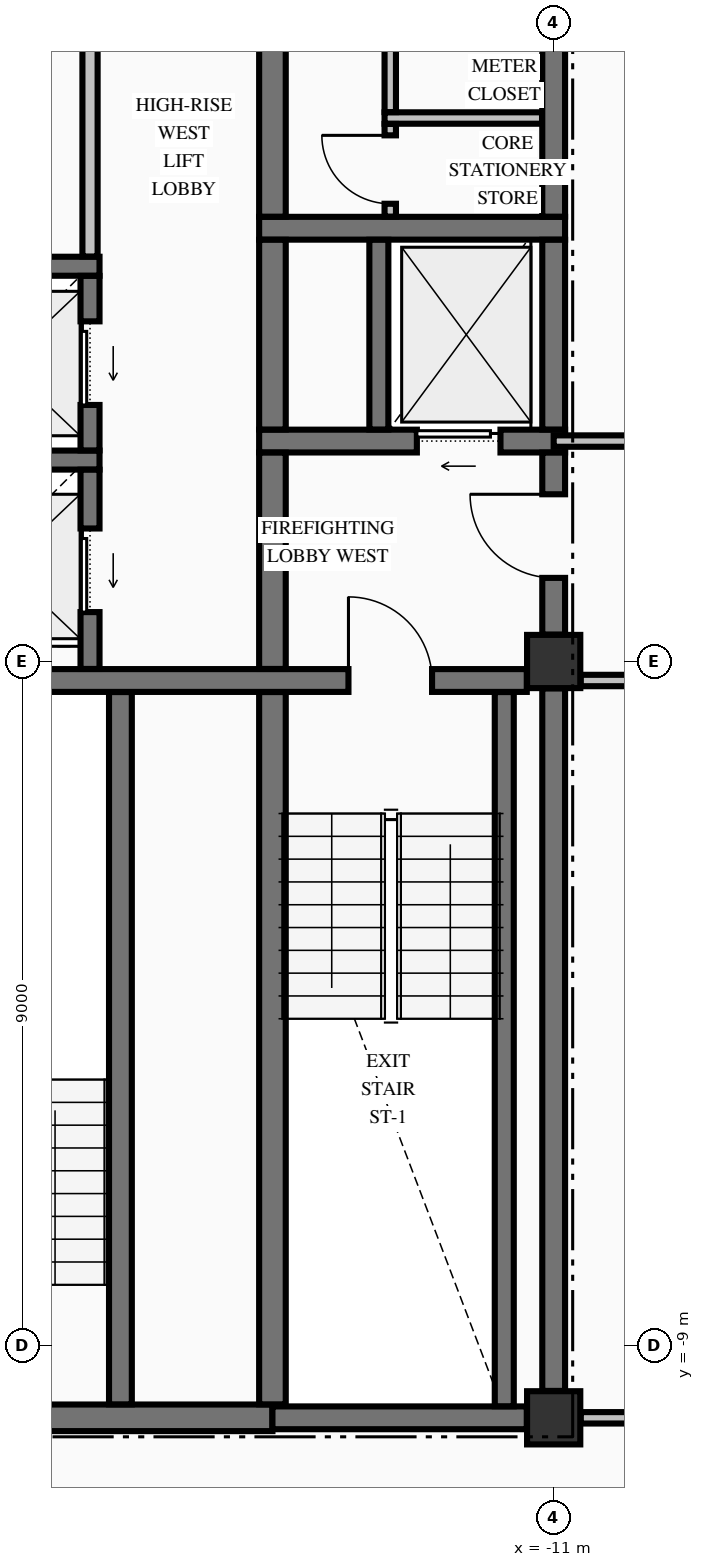
"""IFC4 building model, lengths in metres.
Left out: names, types, materials, properties, quantities, classifications, styles, units other than length and angle.
Written with IfcOpenShell. Run it as: python <this file> out.ifc"""

import sys

from ifc_helpers import new_model, si_unit, direction, frame, frame_2d, origin, origin_2d, place, context, subcontext, project, spatial, rectangle, extrude, element, fill, save


model = new_model("IFC4")
c1 = context("Model", 3, precision=1e-05, world=origin(), true_north=direction((0.0, 1.0)))
c2 = subcontext(c1, "Body", "Model", "MODEL_VIEW")
j1 = project(units=[si_unit("LENGTHUNIT", "METRE"), si_unit("PLANEANGLEUNIT", "RADIAN")], contexts=[c1])
p1 = place(None, origin())
s1 = spatial("IfcSite", under=j1, at=p1, CompositionType="ELEMENT")
p2 = place(p1, origin())
s2 = spatial("IfcBuilding", under=s1, at=p2, CompositionType="ELEMENT")
p3 = place(p2, frame((0.0, 0.0, 233.28)))
s3 = spatial("IfcBuildingStorey", under=s2, at=p3, CompositionType="ELEMENT", Elevation=233.28)
for number, where, z_axis, x_axis in (
    (1, (-11.0, -9.95, -0.25), (0.0, 0.0, 1.0), (1.0, 0.0, 0.0)),
    (2, (-11.0, 0.0, -0.25), (0.0, 0.0, 1.0), (1.0, 0.0, 0.0)),
):
    element("IfcColumn", number, at=place(p3, frame(where, z_axis=z_axis, x_axis=x_axis)), inside=s3, PredefinedType="COLUMN", context=c2, shape_type="SweptSolid", body=[
        extrude(rectangle(XDim=0.7, YDim=0.7, at=origin_2d()), origin(), (0.0, 0.0, 1.0), 3.23),
    ])
p4 = place(p3, frame((-19.646, -9.95, 0.0), z_axis=(0.0, 0.0, 1.0), x_axis=(1.0, 0.0, 0.0)))
e3 = element("IfcWall", 3, at=p4, inside=s3, PredefinedType="SHEAR", context=c2, shape_type="SweptSolid", body=[
    extrude(rectangle(XDim=4.946, YDim=0.35, at=frame_2d((2.473, 0.0))), origin(), (0.0, 0.0, 1.0), 2.98),
])
p5 = place(p4, frame((0.821, 0.0, 0.0)))
e4 = element("IfcOpeningElement", 4, at=p5, cuts=e3, PredefinedType="OPENING", context=c2, shape_type="SweptSolid", body=[
    extrude(rectangle(XDim=1.05, YDim=2.15, at=frame_2d((0.525, 1.075))), frame((0.0, 0.185, 0.0), z_axis=(0.0, -1.0, 0.0), x_axis=(1.0, 0.0, 0.0)), (0.0, 0.0, 1.0), 0.37),
])
p6 = place(p3, frame((-14.7, -9.95, 0.0), z_axis=(0.0, 0.0, 1.0), x_axis=(1.0, 0.0, 0.0)))
e5 = element("IfcWall", 5, at=p6, inside=s3, PredefinedType="SHEAR", context=c2, shape_type="SweptSolid", body=[
    extrude(rectangle(XDim=3.346, YDim=0.3, at=frame_2d((1.673, 0.0))), origin(), (0.0, 0.0, 1.0), 2.98),
])
p7 = place(p3, frame((-20.571, -0.25, 0.0), z_axis=(0.0, 0.0, 1.0), x_axis=(1.0, 0.0, 0.0)))
e6 = element("IfcWall", 6, at=p7, inside=s3, PredefinedType="SHEAR", context=c2, shape_type="SweptSolid", body=[
    extrude(rectangle(XDim=9.217, YDim=0.3, at=frame_2d((4.608, 0.0))), origin(), (0.0, 0.0, 1.0), 2.98),
])
p8 = place(p7, frame((6.871, 0.0, 0.0)))
e7 = element("IfcOpeningElement", 7, at=p8, cuts=e6, PredefinedType="OPENING", context=c2, shape_type="SweptSolid", body=[
    extrude(rectangle(XDim=1.1, YDim=2.15, at=frame_2d((0.55, 1.075))), frame((0.0, 0.16, 0.0), z_axis=(0.0, -1.0, 0.0), x_axis=(1.0, 0.0, 0.0)), (0.0, 0.0, 1.0), 0.32),
])
p9 = place(p3, frame((-20.175, 2.65, 0.0), z_axis=(0.0, 0.0, 1.0), x_axis=(1.0, 0.0, 0.0)))
e8 = element("IfcWall", 8, at=p9, inside=s3, PredefinedType="SOLIDWALL", context=c2, shape_type="SweptSolid", body=[
    extrude(rectangle(XDim=3.2, YDim=0.25, at=frame_2d((1.6, 0.0))), origin(), (0.0, 0.0, 1.0), 2.98),
])
p10 = place(p3, frame((-14.875, 2.9, 0.0), z_axis=(0.0, 0.0, 1.0), x_axis=(1.0, 0.0, 0.0)))
e9 = element("IfcWall", 9, at=p10, inside=s3, PredefinedType="SHEAR", context=c2, shape_type="SweptSolid", body=[
    extrude(rectangle(XDim=4.025, YDim=0.3, at=frame_2d((2.012, 0.0))), origin(), (0.0, 0.0, 1.0), 2.98),
])
p11 = place(p10, frame((2.075, 0.0, 0.0)))
e10 = element("IfcOpeningElement", 10, at=p11, cuts=e9, PredefinedType="OPENING", context=c2, shape_type="SweptSolid", body=[
    extrude(rectangle(XDim=1.1, YDim=2.2, at=frame_2d((0.55, 1.1))), frame((0.0, 0.16, 0.0), z_axis=(0.0, -1.0, 0.0), x_axis=(1.0, 0.0, 0.0)), (0.0, 0.0, 1.0), 0.32),
])
p12 = place(p3, frame((-20.175, 5.2, 0.0), z_axis=(0.0, 0.0, 1.0), x_axis=(1.0, 0.0, 0.0)))
e11 = element("IfcWall", 11, at=p12, inside=s3, PredefinedType="SOLIDWALL", context=c2, shape_type="SweptSolid", body=[
    extrude(rectangle(XDim=3.2, YDim=0.25, at=frame_2d((1.6, 0.0))), origin(), (0.0, 0.0, 1.0), 2.98),
])
p13 = place(p3, frame((-14.875, 5.7, 0.0), z_axis=(0.0, 0.0, 1.0), x_axis=(1.0, 0.0, 0.0)))
e12 = element("IfcWall", 12, at=p13, inside=s3, PredefinedType="SHEAR", context=c2, shape_type="SweptSolid", body=[
    extrude(rectangle(XDim=4.025, YDim=0.3, at=frame_2d((2.012, 0.0))), origin(), (0.0, 0.0, 1.0), 2.98),
])
p14 = place(p3, frame((-10.644, -9.95, 0.0), z_axis=(0.0, 0.0, 1.0), x_axis=(1.0, 0.0, 0.0)))
e13 = element("IfcWall", 13, at=p14, inside=s3, PredefinedType="PARTITIONING", context=c2, shape_type="SweptSolid", body=[
    extrude(rectangle(XDim=21.288, YDim=0.15, at=frame_2d((10.644, 0.0))), origin(), (0.0, 0.0, 1.0), 2.98),
])
p15 = place(p14, frame((8.294, 0.0, 0.0)))
e14 = element("IfcOpeningElement", 14, at=p15, cuts=e13, PredefinedType="OPENING", context=c2, shape_type="SweptSolid", body=[
    extrude(rectangle(XDim=1.1, YDim=2.15, at=frame_2d((0.55, 1.075))), frame((0.0, 0.085, 0.0), z_axis=(0.0, -1.0, 0.0), x_axis=(1.0, 0.0, 0.0)), (0.0, 0.0, 1.0), 0.17),
])
p16 = place(p14, frame((13.769, 0.0, 0.0)))
e15 = element("IfcOpeningElement", 15, at=p16, cuts=e13, PredefinedType="OPENING", context=c2, shape_type="SweptSolid", body=[
    extrude(rectangle(XDim=0.95, YDim=2.15, at=frame_2d((0.475, 1.075))), frame((0.0, 0.085, 0.0), z_axis=(0.0, -1.0, 0.0), x_axis=(1.0, 0.0, 0.0)), (0.0, 0.0, 1.0), 0.17),
])
p17 = place(p14, frame((17.994, 0.0, 0.0)))
e16 = element("IfcOpeningElement", 16, at=p17, cuts=e13, PredefinedType="OPENING", context=c2, shape_type="SweptSolid", body=[
    extrude(rectangle(XDim=0.9, YDim=2.15, at=frame_2d((0.45, 1.075))), frame((0.0, 0.085, 0.0), z_axis=(0.0, -1.0, 0.0), x_axis=(1.0, 0.0, 0.0)), (0.0, 0.0, 1.0), 0.17),
])
p18 = place(p3, frame((-10.644, -0.25, 0.0), z_axis=(0.0, 0.0, 1.0), x_axis=(1.0, 0.0, 0.0)))
e17 = element("IfcWall", 17, at=p18, inside=s3, PredefinedType="PARTITIONING", context=c2, shape_type="SweptSolid", body=[
    extrude(rectangle(XDim=21.288, YDim=0.15, at=frame_2d((10.644, 0.0))), origin(), (0.0, 0.0, 1.0), 2.98),
])
p19 = place(p18, frame((8.294, 0.0, 0.0)))
e18 = element("IfcOpeningElement", 18, at=p19, cuts=e17, PredefinedType="OPENING", context=c2, shape_type="SweptSolid", body=[
    extrude(rectangle(XDim=1.1, YDim=2.15, at=frame_2d((0.55, 1.075))), frame((0.0, 0.085, 0.0), z_axis=(0.0, -1.0, 0.0), x_axis=(1.0, 0.0, 0.0)), (0.0, 0.0, 1.0), 0.17),
])
p20 = place(p18, frame((3.169, 0.0, 0.0)))
e19 = element("IfcOpeningElement", 19, at=p20, cuts=e17, PredefinedType="OPENING", context=c2, shape_type="SweptSolid", body=[
    extrude(rectangle(XDim=1.05, YDim=2.15, at=frame_2d((0.525, 1.075))), frame((0.0, 0.085, 0.0), z_axis=(0.0, -1.0, 0.0), x_axis=(1.0, 0.0, 0.0)), (0.0, 0.0, 1.0), 0.17),
])
p21 = place(p18, frame((15.319, 0.0, 0.0)))
e20 = element("IfcOpeningElement", 20, at=p21, cuts=e17, PredefinedType="OPENING", context=c2, shape_type="SweptSolid", body=[
    extrude(rectangle(XDim=0.95, YDim=2.15, at=frame_2d((0.475, 1.075))), frame((0.0, 0.085, 0.0), z_axis=(0.0, -1.0, 0.0), x_axis=(1.0, 0.0, 0.0)), (0.0, 0.0, 1.0), 0.17),
])
p22 = place(p3, frame((-11.0, 2.9, 0.0), z_axis=(0.0, 0.0, 1.0), x_axis=(1.0, 0.0, 0.0)))
e21 = element("IfcWall", 21, at=p22, inside=s3, PredefinedType="PARTITIONING", context=c2, shape_type="SweptSolid", body=[
    extrude(rectangle(XDim=22.0, YDim=0.15, at=frame_2d((11.0, 0.0))), origin(), (0.0, 0.0, 1.0), 2.98),
])
p23 = place(p22, frame((8.65, 0.0, 0.0)))
e22 = element("IfcOpeningElement", 22, at=p23, cuts=e21, PredefinedType="OPENING", context=c2, shape_type="SweptSolid", body=[
    extrude(rectangle(XDim=1.1, YDim=2.15, at=frame_2d((0.55, 1.075))), frame((0.0, 0.085, 0.0), z_axis=(0.0, -1.0, 0.0), x_axis=(1.0, 0.0, 0.0)), (0.0, 0.0, 1.0), 0.17),
])
p24 = place(p22, frame((3.525, 0.0, 0.0)))
e23 = element("IfcOpeningElement", 23, at=p24, cuts=e21, PredefinedType="OPENING", context=c2, shape_type="SweptSolid", body=[
    extrude(rectangle(XDim=1.05, YDim=2.15, at=frame_2d((0.525, 1.075))), frame((0.0, 0.085, 0.0), z_axis=(0.0, -1.0, 0.0), x_axis=(1.0, 0.0, 0.0)), (0.0, 0.0, 1.0), 0.17),
])
p25 = place(p22, frame((12.225, 0.0, 0.0)))
e24 = element("IfcOpeningElement", 24, at=p25, cuts=e21, PredefinedType="OPENING", context=c2, shape_type="SweptSolid", body=[
    extrude(rectangle(XDim=0.95, YDim=2.15, at=frame_2d((0.475, 1.075))), frame((0.0, 0.085, 0.0), z_axis=(0.0, -1.0, 0.0), x_axis=(1.0, 0.0, 0.0)), (0.0, 0.0, 1.0), 0.17),
])
p26 = place(p22, frame((18.075, 0.0, 0.0)))
e25 = element("IfcOpeningElement", 25, at=p26, cuts=e21, PredefinedType="OPENING", context=c2, shape_type="SweptSolid", body=[
    extrude(rectangle(XDim=0.95, YDim=2.15, at=frame_2d((0.475, 1.075))), frame((0.0, 0.085, 0.0), z_axis=(0.0, -1.0, 0.0), x_axis=(1.0, 0.0, 0.0)), (0.0, 0.0, 1.0), 0.17),
])
p27 = place(p3, frame((-13.225, 7.15, 0.0), z_axis=(0.0, 0.0, 1.0), x_axis=(1.0, 0.0, 0.0)))
e26 = element("IfcWall", 26, at=p27, inside=s3, PredefinedType="PARTITIONING", context=c2, shape_type="SweptSolid", body=[
    extrude(rectangle(XDim=2.072, YDim=0.15, at=frame_2d((1.036, 0.0))), origin(), (0.0, 0.0, 1.0), 2.98),
])
p28 = place(p3, frame((-17.1, -0.098, 0.0), z_axis=(0.0, 0.0, 1.0), x_axis=(0.0, 1.0, 0.0)))
e27 = element("IfcWall", 27, at=p28, inside=s3, PredefinedType="SOLIDWALL", context=c2, shape_type="SweptSolid", body=[
    extrude(rectangle(XDim=2.621, YDim=0.25, at=frame_2d((1.311, 0.0))), origin(), (0.0, 0.0, 1.0), 2.98),
])
p29 = place(p28, frame((0.748, 0.0, 0.0)))
e28 = element("IfcOpeningElement", 28, at=p29, cuts=e27, PredefinedType="OPENING", context=c2, shape_type="SweptSolid", body=[
    extrude(rectangle(XDim=1.1, YDim=2.2, at=frame_2d((0.55, 1.1))), frame((0.0, 0.135, 0.0), z_axis=(0.0, -1.0, 0.0), x_axis=(1.0, 0.0, 0.0)), (0.0, 0.0, 1.0), 0.27),
])
p30 = place(p3, frame((-17.1, 2.777, 0.0), z_axis=(0.0, 0.0, 1.0), x_axis=(0.0, 1.0, 0.0)))
e29 = element("IfcWall", 29, at=p30, inside=s3, PredefinedType="SOLIDWALL", context=c2, shape_type="SweptSolid", body=[
    extrude(rectangle(XDim=2.296, YDim=0.25, at=frame_2d((1.148, 0.0))), origin(), (0.0, 0.0, 1.0), 2.98),
])
p31 = place(p30, frame((0.598, 0.0, 0.0)))
e30 = element("IfcOpeningElement", 30, at=p31, cuts=e29, PredefinedType="OPENING", context=c2, shape_type="SweptSolid", body=[
    extrude(rectangle(XDim=1.1, YDim=2.2, at=frame_2d((0.55, 1.1))), frame((0.0, 0.135, 0.0), z_axis=(0.0, -1.0, 0.0), x_axis=(1.0, 0.0, 0.0)), (0.0, 0.0, 1.0), 0.27),
])
p32 = place(p3, frame((-16.7, -9.773, 0.0), z_axis=(0.0, 0.0, 1.0), x_axis=(0.0, 1.0, 0.0)))
e31 = element("IfcWall", 31, at=p32, inside=s3, PredefinedType="SHEAR", context=c2, shape_type="SweptSolid", body=[
    extrude(rectangle(XDim=9.371, YDim=0.3, at=frame_2d((4.686, 0.0))), origin(), (0.0, 0.0, 1.0), 2.98),
])
p33 = place(p3, frame((-14.7, -9.773, 0.0), z_axis=(0.0, 0.0, 1.0), x_axis=(0.0, 1.0, 0.0)))
e32 = element("IfcWall", 32, at=p33, inside=s3, PredefinedType="SHEAR", context=c2, shape_type="SweptSolid", body=[
    extrude(rectangle(XDim=9.371, YDim=0.35, at=frame_2d((4.686, 0.0))), origin(), (0.0, 0.0, 1.0), 2.98),
])
p34 = place(p3, frame((-14.7, -0.098, 0.0), z_axis=(0.0, 0.0, 1.0), x_axis=(0.0, 1.0, 0.0)))
e33 = element("IfcWall", 33, at=p34, inside=s3, PredefinedType="SHEAR", context=c2, shape_type="SweptSolid", body=[
    extrude(rectangle(XDim=2.846, YDim=0.35, at=frame_2d((1.423, 0.0))), origin(), (0.0, 0.0, 1.0), 2.98),
])
p35 = place(p3, frame((-14.7, 3.052, 0.0), z_axis=(0.0, 0.0, 1.0), x_axis=(0.0, 1.0, 0.0)))
e34 = element("IfcWall", 34, at=p35, inside=s3, PredefinedType="SHEAR", context=c2, shape_type="SweptSolid", body=[
    extrude(rectangle(XDim=2.496, YDim=0.35, at=frame_2d((1.248, 0.0))), origin(), (0.0, 0.0, 1.0), 2.98),
])
p36 = place(p3, frame((-14.7, 5.852, 0.0), z_axis=(0.0, 0.0, 1.0), x_axis=(0.0, 1.0, 0.0)))
e35 = element("IfcWall", 35, at=p36, inside=s3, PredefinedType="SHEAR", context=c2, shape_type="SweptSolid", body=[
    extrude(rectangle(XDim=4.471, YDim=0.35, at=frame_2d((2.235, 0.0))), origin(), (0.0, 0.0, 1.0), 2.98),
])
p37 = place(p3, frame((-13.3, 3.052, 0.0), z_axis=(0.0, 0.0, 1.0), x_axis=(0.0, 1.0, 0.0)))
e36 = element("IfcWall", 36, at=p37, inside=s3, PredefinedType="SOLIDWALL", context=c2, shape_type="SweptSolid", body=[
    extrude(rectangle(XDim=2.496, YDim=0.25, at=frame_2d((1.248, 0.0))), origin(), (0.0, 0.0, 1.0), 2.98),
])
p38 = place(p3, frame((-11.65, -9.798, 0.0), z_axis=(0.0, 0.0, 1.0), x_axis=(0.0, 1.0, 0.0)))
e37 = element("IfcWall", 37, at=p38, inside=s3, PredefinedType="SOLIDWALL", context=c2, shape_type="SweptSolid", body=[
    extrude(rectangle(XDim=9.396, YDim=0.25, at=frame_2d((4.698, 0.0))), origin(), (0.0, 0.0, 1.0), 2.98),
])
p39 = place(p3, frame((-11.0, -9.596, 0.0), z_axis=(0.0, 0.0, 1.0), x_axis=(0.0, 1.0, 0.0)))
e38 = element("IfcWall", 38, at=p39, inside=s3, PredefinedType="SHEAR", context=c2, shape_type="SweptSolid", body=[
    extrude(rectangle(XDim=9.242, YDim=0.3, at=frame_2d((4.621, 0.0))), origin(), (0.0, 0.0, 1.0), 2.98),
])
p40 = place(p3, frame((-11.0, 0.354, 0.0), z_axis=(0.0, 0.0, 1.0), x_axis=(0.0, 1.0, 0.0)))
e39 = element("IfcWall", 39, at=p40, inside=s3, PredefinedType="SHEAR", context=c2, shape_type="SweptSolid", body=[
    extrude(rectangle(XDim=2.394, YDim=0.3, at=frame_2d((1.197, 0.0))), origin(), (0.0, 0.0, 1.0), 2.98),
])
p41 = place(p40, frame((0.746, 0.0, 0.0)))
e40 = element("IfcOpeningElement", 40, at=p41, cuts=e39, PredefinedType="OPENING", context=c2, shape_type="SweptSolid", body=[
    extrude(rectangle(XDim=1.1, YDim=2.15, at=frame_2d((0.55, 1.075))), frame((0.0, 0.16, 0.0), z_axis=(0.0, -1.0, 0.0), x_axis=(1.0, 0.0, 0.0)), (0.0, 0.0, 1.0), 0.32),
])
p42 = place(p3, frame((-11.0, 3.052, 0.0), z_axis=(0.0, 0.0, 1.0), x_axis=(0.0, 1.0, 0.0)))
e41 = element("IfcWall", 41, at=p42, inside=s3, PredefinedType="SHEAR", context=c2, shape_type="SweptSolid", body=[
    extrude(rectangle(XDim=2.496, YDim=0.3, at=frame_2d((1.248, 0.0))), origin(), (0.0, 0.0, 1.0), 2.98),
])
p43 = place(p3, frame((-11.0, 5.852, 0.0), z_axis=(0.0, 0.0, 1.0), x_axis=(0.0, 1.0, 0.0)))
e42 = element("IfcWall", 42, at=p43, inside=s3, PredefinedType="SHEAR", context=c2, shape_type="SweptSolid", body=[
    extrude(rectangle(XDim=4.294, YDim=0.3, at=frame_2d((2.147, 0.0))), origin(), (0.0, 0.0, 1.0), 2.98),
])
p44 = place(p3, frame((-17.1, 5.328, 0.0), z_axis=(0.0, 0.0, 1.0), x_axis=(0.0, 1.0, 0.0)))
e43 = element("IfcWall", 43, at=p44, inside=s3, PredefinedType="PARTITIONING", context=c2, shape_type="SweptSolid", body=[
    extrude(rectangle(XDim=4.994, YDim=0.2, at=frame_2d((2.497, 0.0))), origin(), (0.0, 0.0, 1.0), 2.98),
])
p45 = place(p3, frame((-13.15, 5.853, 0.0), z_axis=(0.0, 0.0, 1.0), x_axis=(0.0, 1.0, 0.0)))
e44 = element("IfcWall", 44, at=p45, inside=s3, PredefinedType="PARTITIONING", context=c2, shape_type="SweptSolid", body=[
    extrude(rectangle(XDim=1.219, YDim=0.15, at=frame_2d((0.609, 0.0))), origin(), (0.0, 0.0, 1.0), 2.98),
])
p46 = place(p45, frame((0.169, 0.0, 0.0)))
e45 = element("IfcOpeningElement", 45, at=p46, cuts=e44, PredefinedType="OPENING", context=c2, shape_type="SweptSolid", body=[
    extrude(rectangle(XDim=0.9, YDim=2.15, at=frame_2d((0.45, 1.075))), frame((0.0, 0.085, 0.0), z_axis=(0.0, -1.0, 0.0), x_axis=(1.0, 0.0, 0.0)), (0.0, 0.0, 1.0), 0.17),
])
p47 = place(p3, frame((-13.15, 7.228, 0.0), z_axis=(0.0, 0.0, 1.0), x_axis=(0.0, 1.0, 0.0)))
e46 = element("IfcWall", 46, at=p47, inside=s3, PredefinedType="PARTITIONING", context=c2, shape_type="SweptSolid", body=[
    extrude(rectangle(XDim=3.119, YDim=0.15, at=frame_2d((1.56, 0.0))), origin(), (0.0, 0.0, 1.0), 2.98),
])
p48 = place(p47, frame((1.097, 0.0, 0.0)))
e47 = element("IfcOpeningElement", 47, at=p48, cuts=e46, PredefinedType="OPENING", context=c2, shape_type="SweptSolid", body=[
    extrude(rectangle(XDim=0.95, YDim=2.15, at=frame_2d((0.475, 1.075))), frame((0.0, 0.085, 0.0), z_axis=(0.0, -1.0, 0.0), x_axis=(1.0, 0.0, 0.0)), (0.0, 0.0, 1.0), 0.17),
])
p49 = place(p8, origin())
e48 = element("IfcDoor", 48, at=p49, inside=s3, OperationType="SINGLE_SWING_LEFT", PredefinedType="DOOR", context=c2, shape_type="SweptSolid", body=[
    extrude(rectangle(XDim=1.1, YDim=2.15, at=frame_2d((0.55, 1.075))), frame((0.0, 0.025, 0.0), z_axis=(0.0, -1.0, 0.0), x_axis=(1.0, 0.0, 0.0)), (0.0, 0.0, 1.0), 0.05),
])
fill(e7, e48)
p50 = place(p41, origin())
e49 = element("IfcDoor", 49, at=p50, inside=s3, OperationType="SINGLE_SWING_RIGHT", PredefinedType="DOOR", context=c2, shape_type="SweptSolid", body=[
    extrude(rectangle(XDim=1.1, YDim=2.15, at=frame_2d((0.55, 1.075))), frame((0.0, 0.025, 0.0), z_axis=(0.0, -1.0, 0.0), x_axis=(1.0, 0.0, 0.0)), (0.0, 0.0, 1.0), 0.05),
])
fill(e40, e49)
p51 = place(p11, origin())
e50 = element("IfcDoor", 50, at=p51, inside=s3, OperationType="SLIDING_TO_LEFT", PredefinedType="DOOR", context=c2, shape_type="SweptSolid", body=[
    extrude(rectangle(XDim=1.1, YDim=2.2, at=frame_2d((0.55, 1.1))), frame((0.0, 0.025, 0.0), z_axis=(0.0, -1.0, 0.0), x_axis=(1.0, 0.0, 0.0)), (0.0, 0.0, 1.0), 0.05),
])
fill(e10, e50)
p52 = place(p46, origin())
e51 = element("IfcDoor", 51, at=p52, inside=s3, OperationType="SINGLE_SWING_RIGHT", PredefinedType="DOOR", context=c2, shape_type="SweptSolid", body=[
    extrude(rectangle(XDim=0.9, YDim=2.15, at=frame_2d((0.45, 1.075))), frame((0.0, 0.025, 0.0), z_axis=(0.0, -1.0, 0.0), x_axis=(1.0, 0.0, 0.0)), (0.0, 0.0, 1.0), 0.05),
])
fill(e45, e51)
p53 = place(p29, origin())
e52 = element("IfcDoor", 52, at=p53, inside=s3, OperationType="SLIDING_TO_LEFT", PredefinedType="DOOR", context=c2, shape_type="SweptSolid", body=[
    extrude(rectangle(XDim=1.1, YDim=2.2, at=frame_2d((0.55, 1.1))), frame((0.0, 0.025, 0.0), z_axis=(0.0, -1.0, 0.0), x_axis=(1.0, 0.0, 0.0)), (0.0, 0.0, 1.0), 0.05),
])
fill(e28, e52)
p54 = place(p31, origin())
e53 = element("IfcDoor", 53, at=p54, inside=s3, OperationType="SLIDING_TO_LEFT", PredefinedType="DOOR", context=c2, shape_type="SweptSolid", body=[
    extrude(rectangle(XDim=1.1, YDim=2.2, at=frame_2d((0.55, 1.1))), frame((0.0, 0.025, 0.0), z_axis=(0.0, -1.0, 0.0), x_axis=(1.0, 0.0, 0.0)), (0.0, 0.0, 1.0), 0.05),
])
fill(e30, e53)
save(model, sys.argv[1])
